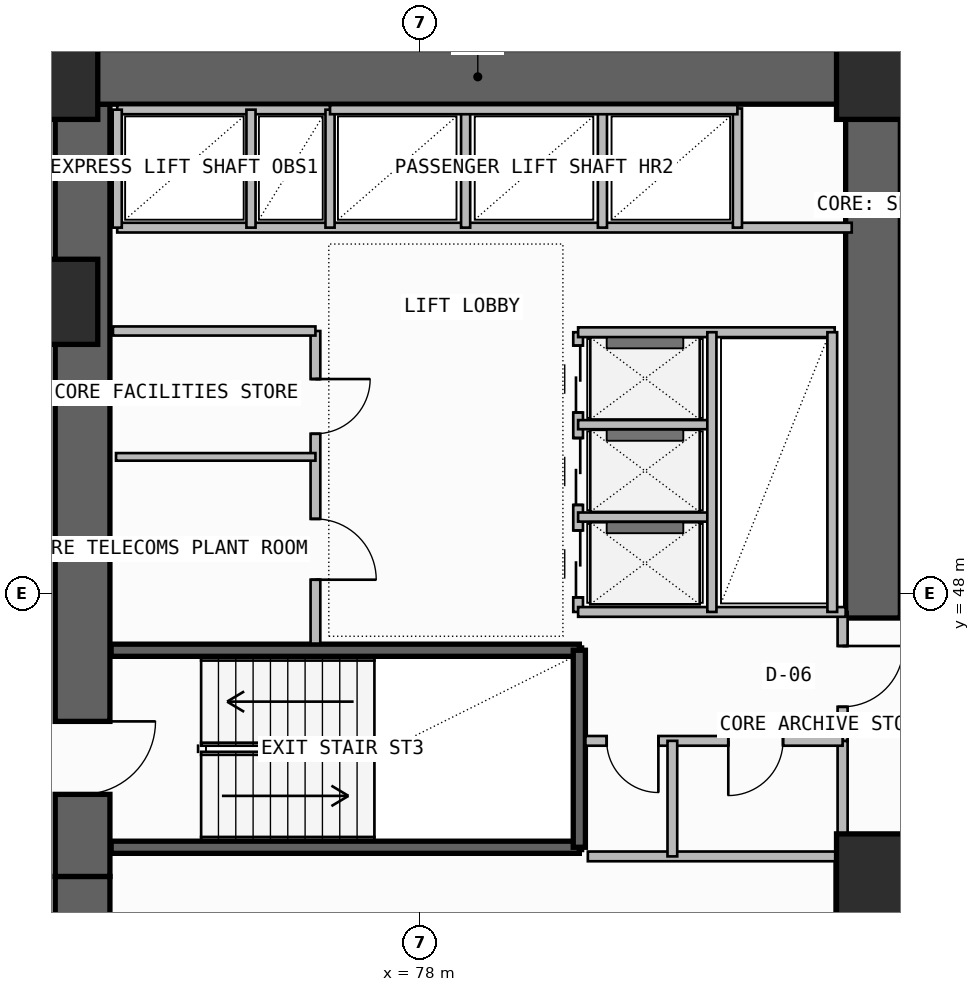
"""IFC4 building model, lengths in metres.
Left out: names, types, materials, properties, quantities, classifications, styles, units other than length and angle.
Written with IfcOpenShell. Run it as: python <this file> out.ifc"""

import sys

from ifc_helpers import new_model, si_unit, direction, frame, frame_2d, origin, origin_2d, place, context, subcontext, project, spatial, rectangle, extrude, element, fill, save


model = new_model("IFC4")
c1 = context("Model", 3, precision=1e-05, world=origin(), true_north=direction((0.0, 1.0)))
c2 = subcontext(c1, "Body", "Model", "MODEL_VIEW")
j1 = project(units=[si_unit("LENGTHUNIT", "METRE"), si_unit("PLANEANGLEUNIT", "RADIAN")], contexts=[c1])
p1 = place(None, origin())
s1 = spatial("IfcSite", under=j1, at=p1, CompositionType="ELEMENT")
p2 = place(p1, origin())
s2 = spatial("IfcBuilding", under=s1, at=p2, CompositionType="ELEMENT")
p3 = place(p2, frame((0.0, 0.0, 161.1)))
s3 = spatial("IfcBuildingStorey", under=s2, at=p3, CompositionType="ELEMENT", Elevation=161.1)
p4 = place(p3, frame((72.45, 35.5, -0.26), z_axis=(0.0, 0.0, 1.0), x_axis=(0.0, 1.0, 0.0)))
e1 = element("IfcWall", 1, at=p4, inside=s3, PredefinedType="SHEAR", context=c2, shape_type="SweptSolid", body=[
    extrude(rectangle(XDim=7.85, YDim=0.9, at=frame_2d((3.925, 0.0))), origin(), (0.0, 0.0, 1.0), 3.46),
])
p5 = place(p4, frame((1.45, 0.0, 0.26)))
e2 = element("IfcOpeningElement", 2, at=p5, cuts=e1, PredefinedType="OPENING", context=c2, shape_type="SweptSolid", body=[
    extrude(rectangle(XDim=1.2, YDim=2.2, at=frame_2d((0.6, 1.1))), frame((0.0, 0.46, 0.0), z_axis=(0.0, -1.0, 0.0), x_axis=(1.0, 0.0, 0.0)), (0.0, 0.0, 1.0), 0.92),
])
p6 = place(p3, frame((72.45, 43.35, -0.26), z_axis=(0.0, 0.0, 1.0), x_axis=(0.0, 1.0, 0.0)))
e3 = element("IfcWall", 3, at=p6, inside=s3, PredefinedType="SHEAR", context=c2, shape_type="SweptSolid", body=[
    extrude(rectangle(XDim=12.7, YDim=0.9, at=frame_2d((6.35, 0.0))), origin(), (0.0, 0.0, 1.0), 3.46),
])
p7 = place(p6, frame((1.35, 0.0, 0.26)))
e4 = element("IfcOpeningElement", 4, at=p7, cuts=e3, PredefinedType="OPENING", context=c2, shape_type="SweptSolid", body=[
    extrude(rectangle(XDim=1.2, YDim=2.2, at=frame_2d((0.6, 1.1))), frame((0.0, 0.46, 0.0), z_axis=(0.0, -1.0, 0.0), x_axis=(1.0, 0.0, 0.0)), (0.0, 0.0, 1.0), 0.92),
])
p8 = place(p3, frame((72.0, 56.5, -0.26), z_axis=(0.0, 0.0, 1.0), x_axis=(1.0, 0.0, 0.0)))
e5 = element("IfcWall", 5, at=p8, inside=s3, PredefinedType="SHEAR", context=c2, shape_type="SweptSolid", body=[
    extrude(rectangle(XDim=13.9, YDim=0.9, at=frame_2d((6.95, 0.0))), origin(), (0.0, 0.0, 1.0), 3.46),
])
p9 = place(p3, frame((85.45, 47.6, -0.26), z_axis=(0.0, 0.0, 1.0), x_axis=(0.0, 1.0, 0.0)))
e6 = element("IfcWall", 6, at=p9, inside=s3, PredefinedType="SHEAR", context=c2, shape_type="SweptSolid", body=[
    extrude(rectangle(XDim=8.45, YDim=0.9, at=frame_2d((4.225, 0.0))), origin(), (0.0, 0.0, 1.0), 3.46),
])
for number, where, z_axis, x_axis in (
    (7, (85.55, 43.35, 0.0), (0.0, 0.0, 1.0), (1.0, 0.0, 0.0)),
    (8, (72.0, 52.8, 0.0), (0.0, 0.0, 1.0), (1.0, 0.0, 0.0)),
    (9, (72.0, 56.5, 0.0), (0.0, 0.0, 1.0), (1.0, 0.0, 0.0)),
    (10, (85.55, 56.5, 0.0), (0.0, 0.0, 1.0), (1.0, 0.0, 0.0)),
):
    element("IfcColumn", number, at=place(p3, frame(where, z_axis=z_axis, x_axis=x_axis)), inside=s3, PredefinedType="COLUMN", context=c2, shape_type="SweptSolid", body=[
        extrude(rectangle(XDim=1.4, YDim=1.4, at=origin_2d()), origin(), (0.0, 0.0, 1.0), 3.6),
    ])
p10 = place(p3, frame((84.92, 38.85, 0.0), z_axis=(0.0, 0.0, 1.0), x_axis=(0.0, 1.0, 0.0)))
e11 = element("IfcWall", 11, at=p10, inside=s3, PredefinedType="SOLIDWALL", context=c2, shape_type="SweptSolid", body=[
    extrude(rectangle(XDim=4.83, YDim=0.2, at=frame_2d((2.415, 0.0))), origin(), (0.0, 0.0, 1.0), 3.2),
])
p11 = place(p10, frame((1.25, 0.0, 0.0)))
e12 = element("IfcOpeningElement", 12, at=p11, cuts=e11, PredefinedType="OPENING", context=c2, shape_type="SweptSolid", body=[
    extrude(rectangle(XDim=1.1, YDim=2.2, at=frame_2d((0.55, 1.1))), frame((0.0, 0.11, 0.0), z_axis=(0.0, -1.0, 0.0), x_axis=(1.0, 0.0, 0.0)), (0.0, 0.0, 1.0), 0.22),
])
for number, where, z_axis, x_axis in (
    (13, (72.92, 43.83, -0.26), (0.0, 0.0, 1.0), (1.0, 0.0, 0.0)),
    (14, (72.92, 47.07, -0.26), (0.0, 0.0, 1.0), (1.0, 0.0, 0.0)),
):
    element("IfcWall", number, at=place(p3, frame(where, z_axis=z_axis, x_axis=x_axis)), inside=s3, PredefinedType="SOLIDWALL", context=c2, shape_type="SweptSolid", body=[
        extrude(rectangle(XDim=7.7, YDim=0.2, at=frame_2d((3.85, 0.0))), origin(), (0.0, 0.0, 1.0), 3.46),
    ])
p12 = place(p3, frame((80.62, 43.83, -0.26), z_axis=(0.0, 0.0, 1.0), x_axis=(0.0, 1.0, 0.0)))
e15 = element("IfcWall", 15, at=p12, inside=s3, PredefinedType="SOLIDWALL", context=c2, shape_type="SweptSolid", body=[
    extrude(rectangle(XDim=3.24, YDim=0.2, at=frame_2d((1.62, 0.0))), origin(), (0.0, 0.0, 1.0), 3.46),
])
p13 = place(p3, frame((84.95, 43.68, 0.0), z_axis=(0.0, 0.0, 1.0), x_axis=(0.0, 1.0, 0.0)))
e16 = element("IfcWall", 16, at=p13, inside=s3, PredefinedType="PLUMBINGWALL", context=c2, shape_type="SweptSolid", body=[
    extrude(rectangle(XDim=1.9, YDim=0.165, at=frame_2d((0.95, 0.0))), origin(), (0.0, 0.0, 1.0), 3.2),
])
p14 = place(p3, frame((84.95, 45.58, 0.0), z_axis=(0.0, 0.0, 1.0), x_axis=(0.0, 1.0, 0.0)))
e17 = element("IfcWall", 17, at=p14, inside=s3, PredefinedType="PARTITIONING", context=c2, shape_type="SweptSolid", body=[
    extrude(rectangle(XDim=2.12, YDim=0.165, at=frame_2d((1.06, 0.0))), origin(), (0.0, 0.0, 1.0), 3.2),
])
p15 = place(p14, frame((0.56, 0.0, 0.0)))
e18 = element("IfcOpeningElement", 18, at=p15, cuts=e17, PredefinedType="OPENING", context=c2, shape_type="SweptSolid", body=[
    extrude(rectangle(XDim=1.0, YDim=2.2, at=frame_2d((0.5, 1.1))), frame((0.0, 0.093, 0.0), z_axis=(0.0, -1.0, 0.0), x_axis=(1.0, 0.0, 0.0)), (0.0, 0.0, 1.0), 0.185),
])
p16 = place(p3, frame((80.72, 45.58, 0.0), z_axis=(0.0, 0.0, 1.0), x_axis=(1.0, 0.0, 0.0)))
e19 = element("IfcWall", 19, at=p16, inside=s3, PredefinedType="PLUMBINGWALL", context=c2, shape_type="SweptSolid", body=[
    extrude(rectangle(XDim=4.23, YDim=0.16, at=frame_2d((2.115, 0.0))), origin(), (0.0, 0.0, 1.0), 3.2),
])
p17 = place(p16, frame((0.35, 0.0, 0.0)))
e20 = element("IfcOpeningElement", 20, at=p17, cuts=e19, PredefinedType="OPENING", context=c2, shape_type="SweptSolid", body=[
    extrude(rectangle(XDim=0.85, YDim=2.05, at=frame_2d((0.425, 1.025))), frame((0.0, 0.09, 0.0), z_axis=(0.0, -1.0, 0.0), x_axis=(1.0, 0.0, 0.0)), (0.0, 0.0, 1.0), 0.18),
])
p18 = place(p16, frame((2.35, 0.0, 0.0)))
e21 = element("IfcOpeningElement", 21, at=p18, cuts=e19, PredefinedType="OPENING", context=c2, shape_type="SweptSolid", body=[
    extrude(rectangle(XDim=0.9, YDim=2.1, at=frame_2d((0.45, 1.05))), frame((0.0, 0.09, 0.0), z_axis=(0.0, -1.0, 0.0), x_axis=(1.0, 0.0, 0.0)), (0.0, 0.0, 1.0), 0.18),
])
p19 = place(p3, frame((80.76, 43.68, 0.0), z_axis=(0.0, 0.0, 1.0), x_axis=(1.0, 0.0, 0.0)))
e22 = element("IfcWall", 22, at=p19, inside=s3, PredefinedType="PLUMBINGWALL", context=c2, shape_type="SweptSolid", body=[
    extrude(rectangle(XDim=4.19, YDim=0.16, at=frame_2d((2.095, 0.0))), origin(), (0.0, 0.0, 1.0), 3.2),
])
p20 = place(p3, frame((82.15, 43.68, 0.0), z_axis=(0.0, 0.0, 1.0), x_axis=(0.0, 1.0, 0.0)))
e23 = element("IfcWall", 23, at=p20, inside=s3, PredefinedType="PLUMBINGWALL", context=c2, shape_type="SweptSolid", body=[
    extrude(rectangle(XDim=1.9, YDim=0.16, at=frame_2d((0.95, 0.0))), origin(), (0.0, 0.0, 1.0), 3.2),
])
p21 = place(p3, frame((76.28, 47.18, 0.0), z_axis=(0.0, 0.0, 1.0), x_axis=(0.0, 1.0, 0.0)))
e24 = element("IfcWall", 24, at=p21, inside=s3, PredefinedType="SOLIDWALL", context=c2, shape_type="SweptSolid", body=[
    extrude(rectangle(XDim=5.14, YDim=0.16, at=frame_2d((2.57, 0.0))), origin(), (0.0, 0.0, 1.0), 3.2),
])
p22 = place(p21, frame((1.05, 0.0, 0.0)))
e25 = element("IfcOpeningElement", 25, at=p22, cuts=e24, PredefinedType="OPENING", context=c2, shape_type="SweptSolid", body=[
    extrude(rectangle(XDim=1.0, YDim=2.2, at=frame_2d((0.5, 1.1))), frame((0.0, 0.09, 0.0), z_axis=(0.0, -1.0, 0.0), x_axis=(1.0, 0.0, 0.0)), (0.0, 0.0, 1.0), 0.18),
])
p23 = place(p21, frame((3.45, 0.0, 0.0)))
e26 = element("IfcOpeningElement", 26, at=p23, cuts=e24, PredefinedType="OPENING", context=c2, shape_type="SweptSolid", body=[
    extrude(rectangle(XDim=0.9, YDim=2.1, at=frame_2d((0.45, 1.05))), frame((0.0, 0.09, 0.0), z_axis=(0.0, -1.0, 0.0), x_axis=(1.0, 0.0, 0.0)), (0.0, 0.0, 1.0), 0.18),
])
p24 = place(p3, frame((72.95, 52.32, 0.0), z_axis=(0.0, 0.0, 1.0), x_axis=(1.0, 0.0, 0.0)))
e27 = element("IfcWall", 27, at=p24, inside=s3, PredefinedType="SOLIDWALL", context=c2, shape_type="SweptSolid", body=[
    extrude(rectangle(XDim=3.33, YDim=0.15, at=frame_2d((1.665, 0.0))), origin(), (0.0, 0.0, 1.0), 3.2),
])
p25 = place(p3, frame((73.0, 50.25, 0.0), z_axis=(0.0, 0.0, 1.0), x_axis=(1.0, 0.0, 0.0)))
e28 = element("IfcWall", 28, at=p25, inside=s3, PredefinedType="PARTITIONING", context=c2, shape_type="SweptSolid", body=[
    extrude(rectangle(XDim=3.28, YDim=0.125, at=frame_2d((1.64, 0.0))), origin(), (0.0, 0.0, 1.0), 3.2),
])
p26 = place(p3, frame((80.6, 47.7, 0.0), z_axis=(0.0, 0.0, 1.0), x_axis=(0.0, 1.0, 0.0)))
e29 = element("IfcWall", 29, at=p26, inside=s3, PredefinedType="SOLIDWALL", context=c2, shape_type="SweptSolid", body=[
    extrude(rectangle(XDim=4.6, YDim=0.16, at=frame_2d((2.3, 0.0))), origin(), (0.0, 0.0, 1.0), 3.2),
])
p27 = place(p26, frame((0.24, 0.0, 0.0)))
e30 = element("IfcOpeningElement", 30, at=p27, cuts=e29, PredefinedType="OPENING", context=c2, shape_type="SweptSolid", body=[
    extrude(rectangle(XDim=1.1, YDim=2.25, at=frame_2d((0.55, 1.125))), frame((0.0, 0.09, 0.0), z_axis=(0.0, -1.0, 0.0), x_axis=(1.0, 0.0, 0.0)), (0.0, 0.0, 1.0), 0.18),
])
p28 = place(p26, frame((1.76, 0.0, 0.0)))
e31 = element("IfcOpeningElement", 31, at=p28, cuts=e29, PredefinedType="OPENING", context=c2, shape_type="SweptSolid", body=[
    extrude(rectangle(XDim=1.1, YDim=2.25, at=frame_2d((0.55, 1.125))), frame((0.0, 0.09, 0.0), z_axis=(0.0, -1.0, 0.0), x_axis=(1.0, 0.0, 0.0)), (0.0, 0.0, 1.0), 0.18),
])
p29 = place(p26, frame((3.28, 0.0, 0.0)))
e32 = element("IfcOpeningElement", 32, at=p29, cuts=e29, PredefinedType="OPENING", context=c2, shape_type="SweptSolid", body=[
    extrude(rectangle(XDim=1.1, YDim=2.25, at=frame_2d((0.55, 1.125))), frame((0.0, 0.09, 0.0), z_axis=(0.0, -1.0, 0.0), x_axis=(1.0, 0.0, 0.0)), (0.0, 0.0, 1.0), 0.18),
])
p30 = place(p3, frame((80.6, 47.7, 0.0), z_axis=(0.0, 0.0, 1.0), x_axis=(1.0, 0.0, 0.0)))
e33 = element("IfcWall", 33, at=p30, inside=s3, PredefinedType="SOLIDWALL", context=c2, shape_type="SweptSolid", body=[
    extrude(rectangle(XDim=4.4, YDim=0.16, at=frame_2d((2.2, 0.0))), origin(), (0.0, 0.0, 1.0), 3.2),
])
p31 = place(p3, frame((80.6, 52.3, 0.0), z_axis=(0.0, 0.0, 1.0), x_axis=(1.0, 0.0, 0.0)))
e34 = element("IfcWall", 34, at=p31, inside=s3, PredefinedType="SOLIDWALL", context=c2, shape_type="SweptSolid", body=[
    extrude(rectangle(XDim=4.22, YDim=0.16, at=frame_2d((2.11, 0.0))), origin(), (0.0, 0.0, 1.0), 3.2),
])
for number, where, z_axis, x_axis in (
    (35, (80.6, 49.26, 0.0), (0.0, 0.0, 1.0), (1.0, 0.0, 0.0)),
    (36, (80.6, 50.78, 0.0), (0.0, 0.0, 1.0), (1.0, 0.0, 0.0)),
):
    element("IfcWall", number, at=place(p3, frame(where, z_axis=z_axis, x_axis=x_axis)), inside=s3, PredefinedType="PLUMBINGWALL", context=c2, shape_type="SweptSolid", body=[
        extrude(rectangle(XDim=2.2, YDim=0.15, at=frame_2d((1.1, 0.0))), origin(), (0.0, 0.0, 1.0), 3.2),
    ])
p32 = place(p3, frame((82.8, 47.7, 0.0), z_axis=(0.0, 0.0, 1.0), x_axis=(0.0, 1.0, 0.0)))
e37 = element("IfcWall", 37, at=p32, inside=s3, PredefinedType="PLUMBINGWALL", context=c2, shape_type="SweptSolid", body=[
    extrude(rectangle(XDim=4.6, YDim=0.15, at=frame_2d((2.3, 0.0))), origin(), (0.0, 0.0, 1.0), 3.2),
])
p33 = place(p3, frame((84.78, 47.7, 0.0), z_axis=(0.0, 0.0, 1.0), x_axis=(0.0, 1.0, 0.0)))
e38 = element("IfcWall", 38, at=p33, inside=s3, PredefinedType="SOLIDWALL", context=c2, shape_type="SweptSolid", body=[
    extrude(rectangle(XDim=4.6, YDim=0.16, at=frame_2d((2.3, 0.0))), origin(), (0.0, 0.0, 1.0), 3.2),
])
p34 = place(p3, frame((73.02, 54.02, 0.0), z_axis=(0.0, 0.0, 1.0), x_axis=(1.0, 0.0, 0.0)))
e39 = element("IfcWall", 39, at=p34, inside=s3, PredefinedType="SOLIDWALL", context=c2, shape_type="SweptSolid", body=[
    extrude(rectangle(XDim=12.08, YDim=0.16, at=frame_2d((6.04, 0.0))), origin(), (0.0, 0.0, 1.0), 3.2),
])
p35 = place(p3, frame((73.02, 55.96, 0.0), z_axis=(0.0, 0.0, 1.0), x_axis=(1.0, 0.0, 0.0)))
e40 = element("IfcWall", 40, at=p35, inside=s3, PredefinedType="SOLIDWALL", context=c2, shape_type="SweptSolid", body=[
    extrude(rectangle(XDim=3.5, YDim=0.15, at=frame_2d((1.75, 0.0))), origin(), (0.0, 0.0, 1.0), 3.2),
])
p36 = place(p3, frame((73.02, 54.02, 0.0), z_axis=(0.0, 0.0, 1.0), x_axis=(0.0, 1.0, 0.0)))
e41 = element("IfcWall", 41, at=p36, inside=s3, PredefinedType="PLUMBINGWALL", context=c2, shape_type="SweptSolid", body=[
    extrude(rectangle(XDim=1.94, YDim=0.15, at=frame_2d((0.97, 0.0))), origin(), (0.0, 0.0, 1.0), 3.2),
])
p37 = place(p3, frame((76.52, 54.02, 0.0), z_axis=(0.0, 0.0, 1.0), x_axis=(0.0, 1.0, 0.0)))
e42 = element("IfcWall", 42, at=p37, inside=s3, PredefinedType="SOLIDWALL", context=c2, shape_type="SweptSolid", body=[
    extrude(rectangle(XDim=1.94, YDim=0.15, at=frame_2d((0.97, 0.0))), origin(), (0.0, 0.0, 1.0), 3.2),
])
p38 = place(p3, frame((75.22, 54.02, 0.0), z_axis=(0.0, 0.0, 1.0), x_axis=(0.0, 1.0, 0.0)))
e43 = element("IfcWall", 43, at=p38, inside=s3, PredefinedType="PLUMBINGWALL", context=c2, shape_type="SweptSolid", body=[
    extrude(rectangle(XDim=1.94, YDim=0.15, at=frame_2d((0.97, 0.0))), origin(), (0.0, 0.0, 1.0), 3.2),
])
for number, where, z_axis, x_axis in (
    (44, (78.75, 54.02, 0.0), (0.0, 0.0, 1.0), (0.0, 1.0, 0.0)),
    (45, (81.0, 54.02, 0.0), (0.0, 0.0, 1.0), (0.0, 1.0, 0.0)),
):
    element("IfcWall", number, at=place(p3, frame(where, z_axis=z_axis, x_axis=x_axis)), inside=s3, PredefinedType="PLUMBINGWALL", context=c2, shape_type="SweptSolid", body=[
        extrude(rectangle(XDim=1.96, YDim=0.15, at=frame_2d((0.98, 0.0))), origin(), (0.0, 0.0, 1.0), 3.2),
    ])
p39 = place(p3, frame((83.22, 54.02, 0.0), z_axis=(0.0, 0.0, 1.0), x_axis=(0.0, 1.0, 0.0)))
e46 = element("IfcWall", 46, at=p39, inside=s3, PredefinedType="SOLIDWALL", context=c2, shape_type="SweptSolid", body=[
    extrude(rectangle(XDim=1.96, YDim=0.15, at=frame_2d((0.98, 0.0))), origin(), (0.0, 0.0, 1.0), 3.2),
])
p40 = place(p3, frame((76.52, 55.96, 0.0), z_axis=(0.0, 0.0, 1.0), x_axis=(1.0, 0.0, 0.0)))
e47 = element("IfcWall", 47, at=p40, inside=s3, PredefinedType="SOLIDWALL", context=c2, shape_type="SweptSolid", body=[
    extrude(rectangle(XDim=6.7, YDim=0.15, at=frame_2d((3.35, 0.0))), origin(), (0.0, 0.0, 1.0), 3.2),
])
p41 = place(p7, frame((1.2, 0.0, 0.0), z_axis=(0.0, 0.0, 1.0), x_axis=(-1.0, 0.0, 0.0)))
e48 = element("IfcDoor", 48, at=p41, inside=s3, OperationType="SINGLE_SWING_LEFT", PredefinedType="USERDEFINED", context=c2, shape_type="SweptSolid", body=[
    extrude(rectangle(XDim=1.2, YDim=2.2, at=frame_2d((0.6, 1.1))), frame((0.0, 0.025, 0.0), z_axis=(0.0, -1.0, 0.0), x_axis=(1.0, 0.0, 0.0)), (0.0, 0.0, 1.0), 0.05),
])
fill(e4, e48)
p42 = place(p15, frame((1.0, 0.0, 0.0), z_axis=(0.0, 0.0, 1.0), x_axis=(-1.0, 0.0, 0.0)))
e49 = element("IfcDoor", 49, at=p42, inside=s3, OperationType="SINGLE_SWING_LEFT", PredefinedType="DOOR", context=c2, shape_type="SweptSolid", body=[
    extrude(rectangle(XDim=1.0, YDim=2.2, at=frame_2d((0.5, 1.1))), frame((0.0, 0.025, 0.0), z_axis=(0.0, -1.0, 0.0), x_axis=(1.0, 0.0, 0.0)), (0.0, 0.0, 1.0), 0.05),
])
fill(e18, e49)
p43 = place(p17, frame((0.85, 0.0, 0.0), z_axis=(0.0, 0.0, 1.0), x_axis=(-1.0, 0.0, 0.0)))
e50 = element("IfcDoor", 50, at=p43, inside=s3, OperationType="SINGLE_SWING_LEFT", PredefinedType="DOOR", context=c2, shape_type="SweptSolid", body=[
    extrude(rectangle(XDim=0.85, YDim=2.05, at=frame_2d((0.425, 1.025))), frame((0.0, 0.025, 0.0), z_axis=(0.0, -1.0, 0.0), x_axis=(1.0, 0.0, 0.0)), (0.0, 0.0, 1.0), 0.05),
])
fill(e20, e50)
p44 = place(p18, frame((0.9, 0.0, 0.0), z_axis=(0.0, 0.0, 1.0), x_axis=(-1.0, 0.0, 0.0)))
e51 = element("IfcDoor", 51, at=p44, inside=s3, OperationType="SINGLE_SWING_RIGHT", PredefinedType="DOOR", context=c2, shape_type="SweptSolid", body=[
    extrude(rectangle(XDim=0.9, YDim=2.1, at=frame_2d((0.45, 1.05))), frame((0.0, 0.025, 0.0), z_axis=(0.0, -1.0, 0.0), x_axis=(1.0, 0.0, 0.0)), (0.0, 0.0, 1.0), 0.05),
])
fill(e21, e51)
p45 = place(p22, frame((1.0, 0.0, 0.0), z_axis=(0.0, 0.0, 1.0), x_axis=(-1.0, 0.0, 0.0)))
e52 = element("IfcDoor", 52, at=p45, inside=s3, OperationType="SINGLE_SWING_RIGHT", PredefinedType="DOOR", context=c2, shape_type="SweptSolid", body=[
    extrude(rectangle(XDim=1.0, YDim=2.2, at=frame_2d((0.5, 1.1))), frame((0.0, 0.025, 0.0), z_axis=(0.0, -1.0, 0.0), x_axis=(1.0, 0.0, 0.0)), (0.0, 0.0, 1.0), 0.05),
])
fill(e25, e52)
p46 = place(p23, frame((0.9, 0.0, 0.0), z_axis=(0.0, 0.0, 1.0), x_axis=(-1.0, 0.0, 0.0)))
e53 = element("IfcDoor", 53, at=p46, inside=s3, OperationType="SINGLE_SWING_LEFT", PredefinedType="DOOR", context=c2, shape_type="SweptSolid", body=[
    extrude(rectangle(XDim=0.9, YDim=2.1, at=frame_2d((0.45, 1.05))), frame((0.0, 0.025, 0.0), z_axis=(0.0, -1.0, 0.0), x_axis=(1.0, 0.0, 0.0)), (0.0, 0.0, 1.0), 0.05),
])
fill(e26, e53)
p47 = place(p27, frame((1.1, 0.0, 0.0), z_axis=(0.0, 0.0, 1.0), x_axis=(-1.0, 0.0, 0.0)))
e54 = element("IfcDoor", 54, at=p47, inside=s3, OperationType="DOUBLE_DOOR_SLIDING", PredefinedType="DOOR", context=c2, shape_type="SweptSolid", body=[
    extrude(rectangle(XDim=1.1, YDim=2.25, at=frame_2d((0.55, 1.125))), frame((0.0, 0.025, 0.0), z_axis=(0.0, -1.0, 0.0), x_axis=(1.0, 0.0, 0.0)), (0.0, 0.0, 1.0), 0.05),
])
fill(e30, e54)
p48 = place(p28, frame((1.1, 0.0, 0.0), z_axis=(0.0, 0.0, 1.0), x_axis=(-1.0, 0.0, 0.0)))
e55 = element("IfcDoor", 55, at=p48, inside=s3, OperationType="DOUBLE_DOOR_SLIDING", PredefinedType="DOOR", context=c2, shape_type="SweptSolid", body=[
    extrude(rectangle(XDim=1.1, YDim=2.25, at=frame_2d((0.55, 1.125))), frame((0.0, 0.025, 0.0), z_axis=(0.0, -1.0, 0.0), x_axis=(1.0, 0.0, 0.0)), (0.0, 0.0, 1.0), 0.05),
])
fill(e31, e55)
p49 = place(p29, frame((1.1, 0.0, 0.0), z_axis=(0.0, 0.0, 1.0), x_axis=(-1.0, 0.0, 0.0)))
e56 = element("IfcDoor", 56, at=p49, inside=s3, OperationType="DOUBLE_DOOR_SLIDING", PredefinedType="DOOR", context=c2, shape_type="SweptSolid", body=[
    extrude(rectangle(XDim=1.1, YDim=2.25, at=frame_2d((0.55, 1.125))), frame((0.0, 0.025, 0.0), z_axis=(0.0, -1.0, 0.0), x_axis=(1.0, 0.0, 0.0)), (0.0, 0.0, 1.0), 0.05),
])
fill(e32, e56)
save(model, sys.argv[1])
